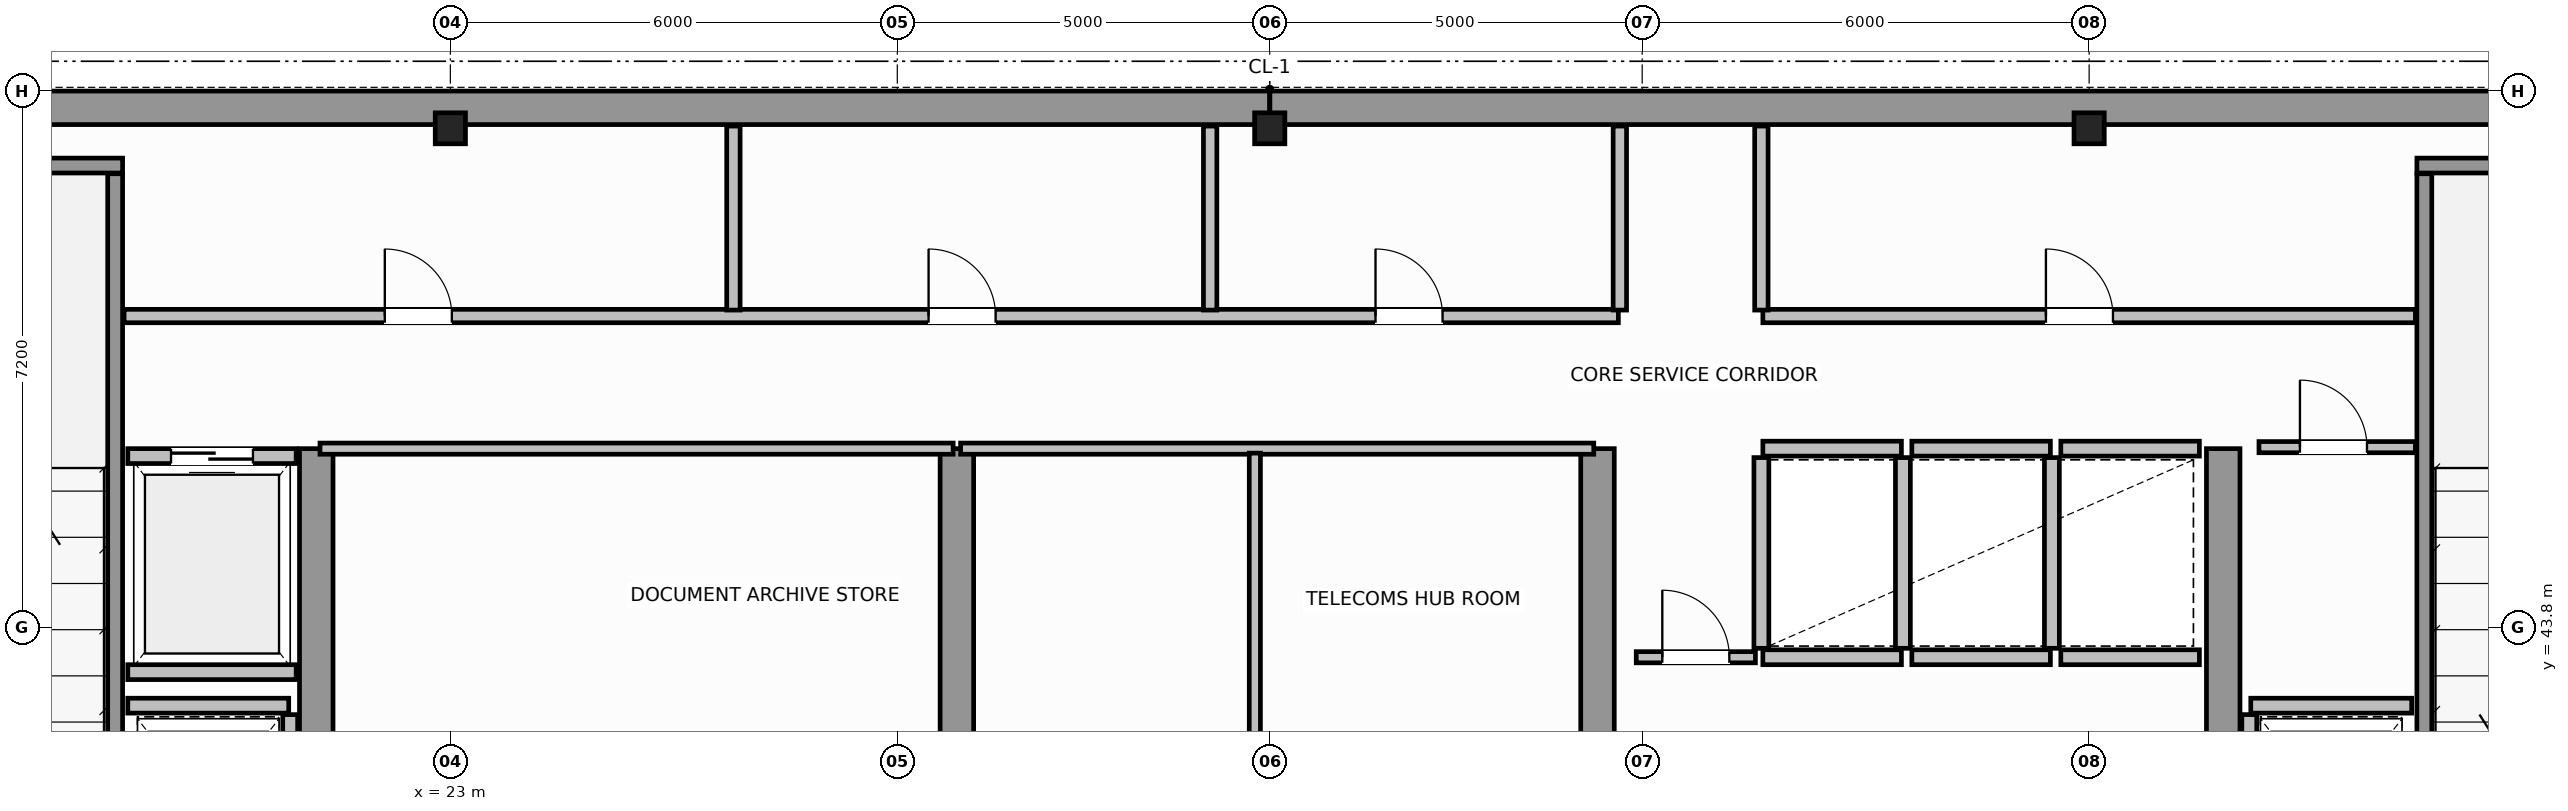
"""IFC4 building model, lengths in metres.
Left out: names, types, materials, properties, quantities, classifications, styles, units other than length and angle.
Written with IfcOpenShell. Run it as: python <this file> out.ifc"""

import sys

from ifc_helpers import new_model, si_unit, direction, frame, frame_2d, origin, origin_2d, place, context, subcontext, project, spatial, rectangle, i_section, extrude, source, transform, mapped, element, fill, save


model = new_model("IFC4")
c1 = context("Model", 3, precision=1e-05, world=origin(), true_north=direction((0.0, 1.0)))
c2 = subcontext(c1, "Body", "Model", "MODEL_VIEW")
j1 = project(units=[si_unit("LENGTHUNIT", "METRE"), si_unit("PLANEANGLEUNIT", "RADIAN")], contexts=[c1])
p1 = place(None, origin())
s1 = spatial("IfcSite", under=j1, at=p1, CompositionType="ELEMENT")
p2 = place(p1, origin())
s2 = spatial("IfcBuilding", under=s1, at=p2, CompositionType="ELEMENT")
p3 = place(p2, frame((0.0, 0.0, 303.8)))
s3 = spatial("IfcBuildingStorey", under=s2, at=p3, CompositionType="ELEMENT", Elevation=303.8)
m1 = source(origin(), c2, "Body", "SweptSolid", [
    extrude(i_section(OverallWidth=0.406, OverallDepth=0.416, WebThickness=0.03, FlangeThickness=0.042, FilletRadius=0.015, at=origin_2d()), origin(), (0.0, 0.0, 1.0), 4.6),
])
for number, where, z_axis, x_axis in (
    (1, (23.0, 50.5, 0.0), (0.0, 0.0, 1.0), (1.0, 0.0, 0.0)),
    (2, (34.0, 50.5, 0.0), (0.0, 0.0, 1.0), (1.0, 0.0, 0.0)),
    (3, (45.0, 50.5, 0.0), (0.0, 0.0, 1.0), (1.0, 0.0, 0.0)),
):
    element("IfcColumn", number, at=place(p3, frame(where, z_axis=z_axis, x_axis=x_axis)), inside=s3, PredefinedType="COLUMN", context=c2, shape_type="MappedRepresentation", body=[
        mapped(m1, transform((0.0, 0.0, 0.0), scale=1.0)),
    ])
for number, where, z_axis, x_axis in (
    (4, (14.229, 50.775, 0.0), (0.0, 0.0, 1.0), (1.0, 0.0, 0.0)),
    (5, (34.002, 50.775, 0.0), (0.0, 0.0, 1.0), (1.0, 0.0, 0.0)),
):
    element("IfcWall", number, at=place(p3, frame(where, z_axis=z_axis, x_axis=x_axis)), inside=s3, PredefinedType="SHEAR", context=c2, shape_type="SweptSolid", body=[
        extrude(rectangle(XDim=19.769, YDim=0.45, at=frame_2d((9.885, 0.0))), origin(), (0.0, 0.0, 1.0), 4.6),
    ])
for number, where, z_axis, x_axis in (
    (6, (21.2, 36.745, 0.0), (0.0, 0.0, 1.0), (0.0, 1.0, 0.0)),
    (7, (29.8, 36.745, 0.0), (0.0, 0.0, 1.0), (0.0, 1.0, 0.0)),
    (8, (38.4, 36.745, 0.0), (0.0, 0.0, 1.0), (0.0, 1.0, 0.0)),
    (9, (46.8, 36.745, 0.0), (0.0, 0.0, 1.0), (0.0, 1.0, 0.0)),
):
    element("IfcWall", number, at=place(p3, frame(where, z_axis=z_axis, x_axis=x_axis)), inside=s3, PredefinedType="SHEAR", context=c2, shape_type="SweptSolid", body=[
        extrude(rectangle(XDim=9.455, YDim=0.45, at=frame_2d((4.728, 0.0))), origin(), (0.0, 0.0, 1.0), 4.6),
    ])
p4 = place(p3, frame((14.225, 50.0, 0.0), z_axis=(0.0, 0.0, 1.0), x_axis=(1.0, 0.0, 0.0)))
e10 = element("IfcWall", 10, at=p4, inside=s3, PredefinedType="SOLIDWALL", context=c2, shape_type="SweptSolid", body=[
    extrude(rectangle(XDim=4.375, YDim=0.2, at=frame_2d((2.188, 0.0))), origin(), (0.0, 0.0, 1.0), 4.6),
])
p5 = place(p3, frame((18.5, 39.96, 0.0), z_axis=(0.0, 0.0, 1.0), x_axis=(0.0, 1.0, 0.0)))
e11 = element("IfcWall", 11, at=p5, inside=s3, PredefinedType="SOLIDWALL", context=c2, shape_type="SweptSolid", body=[
    extrude(rectangle(XDim=9.93, YDim=0.2, at=frame_2d((4.965, 0.0))), origin(), (0.0, 0.0, 1.0), 4.6),
])
p6 = place(p3, frame((49.4, 50.0, 0.0), z_axis=(0.0, 0.0, 1.0), x_axis=(1.0, 0.0, 0.0)))
e12 = element("IfcWall", 12, at=p6, inside=s3, PredefinedType="SOLIDWALL", context=c2, shape_type="SweptSolid", body=[
    extrude(rectangle(XDim=4.375, YDim=0.2, at=frame_2d((2.188, 0.0))), origin(), (0.0, 0.0, 1.0), 4.6),
])
p7 = place(p3, frame((49.5, 39.96, 0.0), z_axis=(0.0, 0.0, 1.0), x_axis=(0.0, 1.0, 0.0)))
e13 = element("IfcWall", 13, at=p7, inside=s3, PredefinedType="SOLIDWALL", context=c2, shape_type="SweptSolid", body=[
    extrude(rectangle(XDim=9.93, YDim=0.2, at=frame_2d((4.965, 0.0))), origin(), (0.0, 0.0, 1.0), 4.6),
])
for number, where, z_axis, x_axis in (
    (14, (40.62, 43.4, 0.0), (0.0, 0.0, 1.0), (1.0, 0.0, 0.0)),
    (15, (40.62, 46.2, 0.0), (0.0, 0.0, 1.0), (1.0, 0.0, 0.0)),
):
    element("IfcWall", number, at=place(p3, frame(where, z_axis=z_axis, x_axis=x_axis)), inside=s3, PredefinedType="SOLIDWALL", context=c2, shape_type="SweptSolid", body=[
        extrude(rectangle(XDim=1.86, YDim=0.2, at=frame_2d((0.93, 0.0))), origin(), (0.0, 0.0, 1.0), 4.3),
    ])
for number, where, z_axis, x_axis in (
    (16, (40.6, 43.52, 0.0), (0.0, 0.0, 1.0), (0.0, 1.0, 0.0)),
    (17, (42.5, 43.52, 0.0), (0.0, 0.0, 1.0), (0.0, 1.0, 0.0)),
):
    element("IfcWall", number, at=place(p3, frame(where, z_axis=z_axis, x_axis=x_axis)), inside=s3, PredefinedType="SOLIDWALL", context=c2, shape_type="SweptSolid", body=[
        extrude(rectangle(XDim=2.56, YDim=0.2, at=frame_2d((1.28, 0.0))), origin(), (0.0, 0.0, 1.0), 4.3),
    ])
for number, where, z_axis, x_axis in (
    (18, (42.62, 43.4, 0.0), (0.0, 0.0, 1.0), (1.0, 0.0, 0.0)),
    (19, (42.62, 46.2, 0.0), (0.0, 0.0, 1.0), (1.0, 0.0, 0.0)),
):
    element("IfcWall", number, at=place(p3, frame(where, z_axis=z_axis, x_axis=x_axis)), inside=s3, PredefinedType="SOLIDWALL", context=c2, shape_type="SweptSolid", body=[
        extrude(rectangle(XDim=1.86, YDim=0.2, at=frame_2d((0.93, 0.0))), origin(), (0.0, 0.0, 1.0), 4.3),
    ])
p8 = place(p3, frame((44.5, 43.52, 0.0), z_axis=(0.0, 0.0, 1.0), x_axis=(0.0, 1.0, 0.0)))
e20 = element("IfcWall", 20, at=p8, inside=s3, PredefinedType="SOLIDWALL", context=c2, shape_type="SweptSolid", body=[
    extrude(rectangle(XDim=2.56, YDim=0.2, at=frame_2d((1.28, 0.0))), origin(), (0.0, 0.0, 1.0), 3.09),
])
for number, where, z_axis, x_axis in (
    (21, (44.62, 43.4, 0.0), (0.0, 0.0, 1.0), (1.0, 0.0, 0.0)),
    (22, (44.62, 46.2, 0.0), (0.0, 0.0, 1.0), (1.0, 0.0, 0.0)),
):
    element("IfcWall", number, at=place(p3, frame(where, z_axis=z_axis, x_axis=x_axis)), inside=s3, PredefinedType="SOLIDWALL", context=c2, shape_type="SweptSolid", body=[
        extrude(rectangle(XDim=1.86, YDim=0.2, at=frame_2d((0.93, 0.0))), origin(), (0.0, 0.0, 1.0), 4.3),
    ])
p9 = place(p3, frame((18.67, 46.1, 0.0), z_axis=(0.0, 0.0, 1.0), x_axis=(1.0, 0.0, 0.0)))
e23 = element("IfcWall", 23, at=p9, inside=s3, PredefinedType="SOLIDWALL", context=c2, shape_type="SweptSolid", body=[
    extrude(rectangle(XDim=2.26, YDim=0.2, at=frame_2d((1.13, 0.0))), origin(), (0.0, 0.0, 1.0), 4.3),
])
p10 = place(p9, frame((0.58, 0.0, 0.0)))
e24 = element("IfcOpeningElement", 24, at=p10, cuts=e23, PredefinedType="OPENING", context=c2, shape_type="SweptSolid", body=[
    extrude(rectangle(XDim=1.1, YDim=2.15, at=frame_2d((0.55, 1.075))), frame((0.0, 0.11, 0.0), z_axis=(0.0, -1.0, 0.0), x_axis=(1.0, 0.0, 0.0)), (0.0, 0.0, 1.0), 0.22),
])
p11 = place(p3, frame((18.67, 43.2, 0.0), z_axis=(0.0, 0.0, 1.0), x_axis=(1.0, 0.0, 0.0)))
e25 = element("IfcWall", 25, at=p11, inside=s3, PredefinedType="SOLIDWALL", context=c2, shape_type="SweptSolid", body=[
    extrude(rectangle(XDim=2.26, YDim=0.2, at=frame_2d((1.13, 0.0))), origin(), (0.0, 0.0, 1.0), 4.3),
])
p12 = place(p3, frame((18.67, 42.75, 0.0), z_axis=(0.0, 0.0, 1.0), x_axis=(1.0, 0.0, 0.0)))
e26 = element("IfcWall", 26, at=p12, inside=s3, PredefinedType="SOLIDWALL", context=c2, shape_type="SweptSolid", body=[
    extrude(rectangle(XDim=2.16, YDim=0.2, at=frame_2d((1.08, 0.0))), origin(), (0.0, 0.0, 1.0), 4.3),
])
p13 = place(p3, frame((20.85, 40.07, 0.0), z_axis=(0.0, 0.0, 1.0), x_axis=(0.0, 1.0, 0.0)))
e27 = element("IfcWall", 27, at=p13, inside=s3, PredefinedType="SOLIDWALL", context=c2, shape_type="SweptSolid", body=[
    extrude(rectangle(XDim=2.56, YDim=0.2, at=frame_2d((1.28, 0.0))), origin(), (0.0, 0.0, 1.0), 4.3),
])
p14 = place(p3, frame((47.17, 42.75, 0.0), z_axis=(0.0, 0.0, 1.0), x_axis=(1.0, 0.0, 0.0)))
e28 = element("IfcWall", 28, at=p14, inside=s3, PredefinedType="SOLIDWALL", context=c2, shape_type="SweptSolid", body=[
    extrude(rectangle(XDim=2.16, YDim=0.2, at=frame_2d((1.08, 0.0))), origin(), (0.0, 0.0, 1.0), 4.3),
])
p15 = place(p3, frame((47.15, 40.07, 0.0), z_axis=(0.0, 0.0, 1.0), x_axis=(0.0, 1.0, 0.0)))
e29 = element("IfcWall", 29, at=p15, inside=s3, PredefinedType="SOLIDWALL", context=c2, shape_type="SweptSolid", body=[
    extrude(rectangle(XDim=2.56, YDim=0.2, at=frame_2d((1.28, 0.0))), origin(), (0.0, 0.0, 1.0), 4.3),
])
for number, where, z_axis, x_axis in (
    (30, (21.25, 46.2, 0.0), (0.0, 0.0, 1.0), (1.0, 0.0, 0.0)),
    (31, (29.85, 46.2, 0.0), (0.0, 0.0, 1.0), (1.0, 0.0, 0.0)),
):
    element("IfcWall", number, at=place(p3, frame(where, z_axis=z_axis, x_axis=x_axis)), inside=s3, PredefinedType="PARTITIONING", context=c2, shape_type="SweptSolid", body=[
        extrude(rectangle(XDim=8.5, YDim=0.15, at=frame_2d((4.25, 0.0))), origin(), (0.0, 0.0, 1.0), 4.3),
    ])
p16 = place(p3, frame((33.8, 36.56, 0.0), z_axis=(0.0, 0.0, 1.0), x_axis=(0.0, 1.0, 0.0)))
e32 = element("IfcWall", 32, at=p16, inside=s3, PredefinedType="PARTITIONING", context=c2, shape_type="SweptSolid", body=[
    extrude(rectangle(XDim=9.58, YDim=0.15, at=frame_2d((4.79, 0.0))), origin(), (0.0, 0.0, 1.0), 4.3),
])
p17 = place(p16, frame((4.2, 0.0, 0.0)))
e33 = element("IfcOpeningElement", 33, at=p17, cuts=e32, PredefinedType="OPENING", context=c2, shape_type="SweptSolid", body=[
    extrude(rectangle(XDim=0.9, YDim=2.1, at=frame_2d((0.45, 1.05))), frame((0.0, 0.085, 0.0), z_axis=(0.0, -1.0, 0.0), x_axis=(1.0, 0.0, 0.0)), (0.0, 0.0, 1.0), 0.17),
])
p18 = place(p3, frame((47.28, 46.22, 0.0), z_axis=(0.0, 0.0, 1.0), x_axis=(1.0, 0.0, 0.0)))
e34 = element("IfcWall", 34, at=p18, inside=s3, PredefinedType="PARTITIONING", context=c2, shape_type="SweptSolid", body=[
    extrude(rectangle(XDim=2.1, YDim=0.15, at=frame_2d((1.05, 0.0))), origin(), (0.0, 0.0, 1.0), 4.3),
])
p19 = place(p18, frame((0.55, 0.0, 0.0)))
e35 = element("IfcOpeningElement", 35, at=p19, cuts=e34, PredefinedType="OPENING", context=c2, shape_type="SweptSolid", body=[
    extrude(rectangle(XDim=0.9, YDim=2.1, at=frame_2d((0.45, 1.05))), frame((0.0, 0.085, 0.0), z_axis=(0.0, -1.0, 0.0), x_axis=(1.0, 0.0, 0.0)), (0.0, 0.0, 1.0), 0.17),
])
p20 = place(p3, frame((38.92, 43.4, 0.0), z_axis=(0.0, 0.0, 1.0), x_axis=(1.0, 0.0, 0.0)))
e36 = element("IfcWall", 36, at=p20, inside=s3, PredefinedType="PARTITIONING", context=c2, shape_type="SweptSolid", body=[
    extrude(rectangle(XDim=1.6, YDim=0.15, at=frame_2d((0.8, 0.0))), origin(), (0.0, 0.0, 1.0), 4.3),
])
p21 = place(p20, frame((0.35, 0.0, 0.0)))
e37 = element("IfcOpeningElement", 37, at=p21, cuts=e36, PredefinedType="OPENING", context=c2, shape_type="SweptSolid", body=[
    extrude(rectangle(XDim=0.9, YDim=2.1, at=frame_2d((0.45, 1.05))), frame((0.0, 0.085, 0.0), z_axis=(0.0, -1.0, 0.0), x_axis=(1.0, 0.0, 0.0)), (0.0, 0.0, 1.0), 0.17),
])
p22 = place(p3, frame((18.62, 47.98, 0.0), z_axis=(0.0, 0.0, 1.0), x_axis=(1.0, 0.0, 0.0)))
e38 = element("IfcWall", 38, at=p22, inside=s3, PredefinedType="PLUMBINGWALL", context=c2, shape_type="SweptSolid", body=[
    extrude(rectangle(XDim=20.06, YDim=0.18, at=frame_2d((10.03, 0.0))), origin(), (0.0, 0.0, 1.0), 4.3),
])
p23 = place(p22, frame((3.5, 0.0, 0.0)))
e39 = element("IfcOpeningElement", 39, at=p23, cuts=e38, PredefinedType="OPENING", context=c2, shape_type="SweptSolid", body=[
    extrude(rectangle(XDim=0.9, YDim=2.15, at=frame_2d((0.45, 1.075))), frame((0.0, 0.1, 0.0), z_axis=(0.0, -1.0, 0.0), x_axis=(1.0, 0.0, 0.0)), (0.0, 0.0, 1.0), 0.2),
])
p24 = place(p22, frame((10.8, 0.0, 0.0)))
e40 = element("IfcOpeningElement", 40, at=p24, cuts=e38, PredefinedType="OPENING", context=c2, shape_type="SweptSolid", body=[
    extrude(rectangle(XDim=0.9, YDim=2.15, at=frame_2d((0.45, 1.075))), frame((0.0, 0.1, 0.0), z_axis=(0.0, -1.0, 0.0), x_axis=(1.0, 0.0, 0.0)), (0.0, 0.0, 1.0), 0.2),
])
p25 = place(p22, frame((16.8, 0.0, 0.0)))
e41 = element("IfcOpeningElement", 41, at=p25, cuts=e38, PredefinedType="OPENING", context=c2, shape_type="SweptSolid", body=[
    extrude(rectangle(XDim=0.9, YDim=2.15, at=frame_2d((0.45, 1.075))), frame((0.0, 0.1, 0.0), z_axis=(0.0, -1.0, 0.0), x_axis=(1.0, 0.0, 0.0)), (0.0, 0.0, 1.0), 0.2),
])
p26 = place(p3, frame((40.62, 47.98, 0.0), z_axis=(0.0, 0.0, 1.0), x_axis=(1.0, 0.0, 0.0)))
e42 = element("IfcWall", 42, at=p26, inside=s3, PredefinedType="PLUMBINGWALL", context=c2, shape_type="SweptSolid", body=[
    extrude(rectangle(XDim=8.76, YDim=0.18, at=frame_2d((4.38, 0.0))), origin(), (0.0, 0.0, 1.0), 4.3),
])
p27 = place(p26, frame((3.8, 0.0, 0.0)))
e43 = element("IfcOpeningElement", 43, at=p27, cuts=e42, PredefinedType="OPENING", context=c2, shape_type="SweptSolid", body=[
    extrude(rectangle(XDim=0.9, YDim=2.15, at=frame_2d((0.45, 1.075))), frame((0.0, 0.1, 0.0), z_axis=(0.0, -1.0, 0.0), x_axis=(1.0, 0.0, 0.0)), (0.0, 0.0, 1.0), 0.2),
])
for number, where, z_axis, x_axis in (
    (44, (26.8, 48.06, 0.0), (0.0, 0.0, 1.0), (0.0, 1.0, 0.0)),
    (45, (33.2, 48.06, 0.0), (0.0, 0.0, 1.0), (0.0, 1.0, 0.0)),
    (46, (38.7, 48.06, 0.0), (0.0, 0.0, 1.0), (0.0, 1.0, 0.0)),
    (47, (40.6, 48.06, 0.0), (0.0, 0.0, 1.0), (0.0, 1.0, 0.0)),
):
    element("IfcWall", number, at=place(p3, frame(where, z_axis=z_axis, x_axis=x_axis)), inside=s3, PredefinedType="PLUMBINGWALL", context=c2, shape_type="SweptSolid", body=[
        extrude(rectangle(XDim=2.47, YDim=0.18, at=frame_2d((1.235, 0.0))), origin(), (0.0, 0.0, 1.0), 4.3),
    ])
m2 = source(origin(), c2, "Body", "SweptSolid", [
    extrude(rectangle(XDim=1.1, YDim=2.15, at=frame_2d((0.55, 1.075))), frame((0.0, 0.025, 0.0), z_axis=(0.0, -1.0, 0.0), x_axis=(1.0, 0.0, 0.0)), (0.0, 0.0, 1.0), 0.05),
])
p28 = place(p10, origin())
e48 = element("IfcDoor", 48, at=p28, inside=s3, OperationType="DOUBLE_DOOR_SLIDING", PredefinedType="DOOR", context=c2, shape_type="MappedRepresentation", body=[
    mapped(m2, transform((0.0, 0.0, 0.0), scale=1.0)),
])
fill(e24, e48)
m3 = source(origin(), c2, "Body", "SweptSolid", [
    extrude(rectangle(XDim=0.9, YDim=2.1, at=frame_2d((0.45, 1.05))), frame((0.0, 0.025, 0.0), z_axis=(0.0, -1.0, 0.0), x_axis=(1.0, 0.0, 0.0)), (0.0, 0.0, 1.0), 0.05),
])
p29 = place(p19, origin())
e49 = element("IfcDoor", 49, at=p29, inside=s3, OperationType="SINGLE_SWING_RIGHT", PredefinedType="DOOR", context=c2, shape_type="MappedRepresentation", body=[
    mapped(m3, transform((0.0, 0.0, 0.0), scale=1.0)),
])
fill(e35, e49)
p30 = place(p21, origin())
e50 = element("IfcDoor", 50, at=p30, inside=s3, OperationType="SINGLE_SWING_LEFT", PredefinedType="DOOR", context=c2, shape_type="MappedRepresentation", body=[
    mapped(m3, transform((0.0, 0.0, 0.0), scale=1.0)),
])
fill(e37, e50)
m4 = source(origin(), c2, "Body", "SweptSolid", [
    extrude(rectangle(XDim=0.9, YDim=2.15, at=frame_2d((0.45, 1.075))), frame((0.0, 0.025, 0.0), z_axis=(0.0, -1.0, 0.0), x_axis=(1.0, 0.0, 0.0)), (0.0, 0.0, 1.0), 0.05),
])
p31 = place(p23, origin())
e51 = element("IfcDoor", 51, at=p31, inside=s3, OperationType="SINGLE_SWING_LEFT", PredefinedType="DOOR", context=c2, shape_type="MappedRepresentation", body=[
    mapped(m4, transform((0.0, 0.0, 0.0), scale=1.0)),
])
fill(e39, e51)
p32 = place(p24, origin())
e52 = element("IfcDoor", 52, at=p32, inside=s3, OperationType="SINGLE_SWING_RIGHT", PredefinedType="DOOR", context=c2, shape_type="MappedRepresentation", body=[
    mapped(m4, transform((0.0, 0.0, 0.0), scale=1.0)),
])
fill(e40, e52)
p33 = place(p25, origin())
e53 = element("IfcDoor", 53, at=p33, inside=s3, OperationType="SINGLE_SWING_LEFT", PredefinedType="DOOR", context=c2, shape_type="MappedRepresentation", body=[
    mapped(m4, transform((0.0, 0.0, 0.0), scale=1.0)),
])
fill(e41, e53)
p34 = place(p27, origin())
e54 = element("IfcDoor", 54, at=p34, inside=s3, OperationType="SINGLE_SWING_RIGHT", PredefinedType="DOOR", context=c2, shape_type="MappedRepresentation", body=[
    mapped(m4, transform((0.0, 0.0, 0.0), scale=1.0)),
])
fill(e43, e54)
save(model, sys.argv[1])
